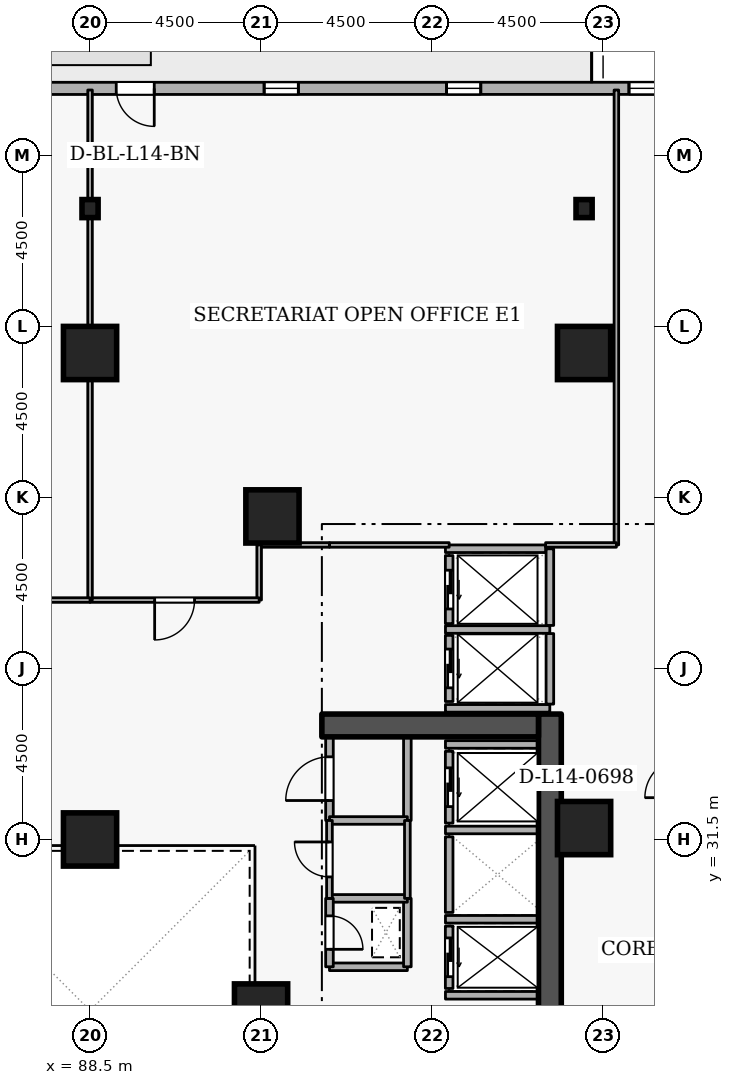
"""IFC4 building model, lengths in metres.
Left out: names, types, materials, properties, quantities, classifications, styles, units other than length and angle.
Written with IfcOpenShell. Run it as: python <this file> out.ifc"""

import sys

from ifc_helpers import new_model, si_unit, direction, frame, frame_2d, origin, origin_2d, place, context, subcontext, project, spatial, rectangle, i_section, extrude, element, fill, save


model = new_model("IFC4")
c1 = context("Model", 3, precision=1e-05, world=origin(), true_north=direction((0.0, 1.0)))
c2 = subcontext(c1, "Body", "Model", "MODEL_VIEW")
j1 = project(units=[si_unit("LENGTHUNIT", "METRE"), si_unit("PLANEANGLEUNIT", "RADIAN")], contexts=[c1])
p1 = place(None, origin())
s1 = spatial("IfcSite", under=j1, at=p1, CompositionType="ELEMENT")
p2 = place(p1, origin())
s2 = spatial("IfcBuilding", under=s1, at=p2, CompositionType="ELEMENT")
p3 = place(p2, frame((0.0, 0.0, 57.3)))
s3 = spatial("IfcBuildingStorey", under=s2, at=p3, CompositionType="ELEMENT", Elevation=57.3)
p4 = place(p3, frame((100.6, 19.2, 0.0), z_axis=(0.0, 0.0, 1.0), x_axis=(0.0, 1.0, 0.0)))
e1 = element("IfcWall", 1, at=p4, inside=s3, PredefinedType="SHEAR", context=c2, shape_type="SweptSolid", body=[
    extrude(rectangle(XDim=15.6, YDim=0.6, at=frame_2d((7.8, 0.0))), origin(), (0.0, 0.0, 1.0), 3.6),
])
p5 = place(p3, frame((94.6, 34.5, 0.0), z_axis=(0.0, 0.0, 1.0), x_axis=(1.0, 0.0, 0.0)))
e2 = element("IfcWall", 2, at=p5, inside=s3, PredefinedType="SHEAR", context=c2, shape_type="SweptSolid", body=[
    extrude(rectangle(XDim=5.7, YDim=0.6, at=frame_2d((2.85, 0.0))), origin(), (0.0, 0.0, 1.0), 3.6),
])
for number, where, z_axis, x_axis in (
    (3, (101.5, 44.3, 0.0), (0.0, 0.0, 1.0), (1.0, 0.0, 0.0)),
    (4, (88.5, 44.3, 0.0), (0.0, 0.0, 1.0), (1.0, 0.0, 0.0)),
    (5, (93.3, 40.0, 0.0), (0.0, 0.0, 1.0), (1.0, 0.0, 0.0)),
    (6, (101.5, 31.8, 0.0), (0.0, 0.0, 1.0), (1.0, 0.0, 0.0)),
    (7, (93.0, 27.0, 0.0), (0.0, 0.0, 1.0), (1.0, 0.0, 0.0)),
    (8, (88.5, 31.5, 0.0), (0.0, 0.0, 1.0), (1.0, 0.0, 0.0)),
):
    element("IfcColumn", number, at=place(p3, frame(where, z_axis=z_axis, x_axis=x_axis)), inside=s3, PredefinedType="COLUMN", context=c2, shape_type="SweptSolid", body=[
        extrude(rectangle(XDim=1.4, YDim=1.4, at=origin_2d()), origin(), (0.0, 0.0, 1.0), 3.6),
    ])
for number, where, z_axis, x_axis in (
    (9, (101.5, 48.1, 0.0), (0.0, 0.0, 1.0), (1.0, 0.0, 0.0)),
    (10, (88.5, 48.1, 0.0), (0.0, 0.0, 1.0), (1.0, 0.0, 0.0)),
):
    element("IfcColumn", number, at=place(p3, frame(where, z_axis=z_axis, x_axis=x_axis)), inside=s3, PredefinedType="COLUMN", context=c2, shape_type="SweptSolid", body=[
        extrude(i_section(OverallWidth=0.424, OverallDepth=0.475, WebThickness=0.048, FlangeThickness=0.077, FilletRadius=0.015, at=origin_2d()), origin(), (0.0, 0.0, 1.0), 3.6),
    ])
p6 = place(p3, frame((110.181, 51.265, 0.0), z_axis=(0.0, 0.0, 1.0), x_axis=(-0.999999996195, -8.7231344e-05, 0.0)))
e11 = element("IfcWall", 11, at=p6, inside=s3, PredefinedType="STANDARD", context=c2, shape_type="SweptSolid", body=[
    extrude(rectangle(XDim=36.384, YDim=0.32, at=frame_2d((18.192, 0.0))), origin(), (0.0, 0.0, 1.0), 2.7),
])
p7 = place(p6, frame((19.992, 0.0, 0.0)))
e12 = element("IfcOpeningElement", 12, at=p7, cuts=e11, PredefinedType="OPENING", context=c2, shape_type="SweptSolid", body=[
    extrude(rectangle(XDim=1.0, YDim=2.08, at=frame_2d((0.5, 1.04))), frame((0.0, 0.17, 0.0), z_axis=(0.0, -1.0, 0.0), x_axis=(1.0, 0.0, 0.0)), (0.0, 0.0, 1.0), 0.34),
])
p8 = place(p6, frame((1.8, 0.0, 0.72)))
e13 = element("IfcOpeningElement", 13, at=p8, cuts=e11, PredefinedType="OPENING", context=c2, shape_type="SweptSolid", body=[
    extrude(rectangle(XDim=0.9, YDim=1.75, at=frame_2d((0.45, 0.875))), frame((0.0, 0.17, 0.0), z_axis=(0.0, -1.0, 0.0), x_axis=(1.0, 0.0, 0.0)), (0.0, 0.0, 1.0), 0.34),
])
p9 = place(p6, frame((6.6, 0.0, 0.72)))
e14 = element("IfcOpeningElement", 14, at=p9, cuts=e11, PredefinedType="OPENING", context=c2, shape_type="SweptSolid", body=[
    extrude(rectangle(XDim=0.9, YDim=1.75, at=frame_2d((0.45, 0.875))), frame((0.0, 0.17, 0.0), z_axis=(0.0, -1.0, 0.0), x_axis=(1.0, 0.0, 0.0)), (0.0, 0.0, 1.0), 0.34),
])
p10 = place(p6, frame((11.4, 0.0, 0.72)))
e15 = element("IfcOpeningElement", 15, at=p10, cuts=e11, PredefinedType="OPENING", context=c2, shape_type="SweptSolid", body=[
    extrude(rectangle(XDim=0.9, YDim=1.75, at=frame_2d((0.45, 0.875))), frame((0.0, 0.17, 0.0), z_axis=(0.0, -1.0, 0.0), x_axis=(1.0, 0.0, 0.0)), (0.0, 0.0, 1.0), 0.34),
])
p11 = place(p6, frame((16.2, 0.0, 0.72)))
e16 = element("IfcOpeningElement", 16, at=p11, cuts=e11, PredefinedType="OPENING", context=c2, shape_type="SweptSolid", body=[
    extrude(rectangle(XDim=0.9, YDim=1.75, at=frame_2d((0.45, 0.875))), frame((0.0, 0.17, 0.0), z_axis=(0.0, -1.0, 0.0), x_axis=(1.0, 0.0, 0.0)), (0.0, 0.0, 1.0), 0.34),
])
p12 = place(p6, frame((25.8, 0.0, 0.72)))
e17 = element("IfcOpeningElement", 17, at=p12, cuts=e11, PredefinedType="OPENING", context=c2, shape_type="SweptSolid", body=[
    extrude(rectangle(XDim=0.9, YDim=1.75, at=frame_2d((0.45, 0.875))), frame((0.0, 0.17, 0.0), z_axis=(0.0, -1.0, 0.0), x_axis=(1.0, 0.0, 0.0)), (0.0, 0.0, 1.0), 0.34),
])
p13 = place(p6, frame((30.6, 0.0, 0.72)))
e18 = element("IfcOpeningElement", 18, at=p13, cuts=e11, PredefinedType="OPENING", context=c2, shape_type="SweptSolid", body=[
    extrude(rectangle(XDim=0.9, YDim=1.75, at=frame_2d((0.45, 0.875))), frame((0.0, 0.17, 0.0), z_axis=(0.0, -1.0, 0.0), x_axis=(1.0, 0.0, 0.0)), (0.0, 0.0, 1.0), 0.34),
])
p14 = place(p3, frame((97.95, 29.22, 0.0), z_axis=(0.0, 0.0, 1.0), x_axis=(0.0, -1.0, 0.0)))
e19 = element("IfcWall", 19, at=p14, inside=s3, PredefinedType="STANDARD", context=c2, shape_type="SweptSolid", body=[
    extrude(rectangle(XDim=1.64, YDim=0.2, at=frame_2d((0.82, 0.0))), origin(), (0.0, 0.0, 1.0), 3.34),
])
p15 = place(p14, frame((0.31, 0.0, 0.0)))
e20 = element("IfcOpeningElement", 20, at=p15, cuts=e19, PredefinedType="OPENING", context=c2, shape_type="SweptSolid", body=[
    extrude(rectangle(XDim=1.02, YDim=2.06, at=frame_2d((0.51, 1.03))), frame((0.0, 0.11, 0.0), z_axis=(0.0, -1.0, 0.0), x_axis=(1.0, 0.0, 0.0)), (0.0, 0.0, 1.0), 0.22),
])
p16 = place(p3, frame((97.95, 31.57, 0.0), z_axis=(0.0, 0.0, 1.0), x_axis=(0.0, -1.0, 0.0)))
e21 = element("IfcWall", 21, at=p16, inside=s3, PredefinedType="STANDARD", context=c2, shape_type="SweptSolid", body=[
    extrude(rectangle(XDim=1.99, YDim=0.2, at=frame_2d((0.995, 0.0))), origin(), (0.0, 0.0, 1.0), 3.34),
])
p17 = place(p3, frame((97.95, 33.82, 0.0), z_axis=(0.0, 0.0, 1.0), x_axis=(0.0, -1.0, 0.0)))
e22 = element("IfcWall", 22, at=p17, inside=s3, PredefinedType="STANDARD", context=c2, shape_type="SweptSolid", body=[
    extrude(rectangle(XDim=1.89, YDim=0.2, at=frame_2d((0.945, 0.0))), origin(), (0.0, 0.0, 1.0), 3.34),
])
p18 = place(p17, frame((0.435, 0.0, 0.0)))
e23 = element("IfcOpeningElement", 23, at=p18, cuts=e22, PredefinedType="OPENING", context=c2, shape_type="SweptSolid", body=[
    extrude(rectangle(XDim=1.02, YDim=2.06, at=frame_2d((0.51, 1.03))), frame((0.0, 0.11, 0.0), z_axis=(0.0, -1.0, 0.0), x_axis=(1.0, 0.0, 0.0)), (0.0, 0.0, 1.0), 0.22),
])
p19 = place(p3, frame((97.95, 36.87, 0.0), z_axis=(0.0, 0.0, 1.0), x_axis=(0.0, -1.0, 0.0)))
e24 = element("IfcWall", 24, at=p19, inside=s3, PredefinedType="STANDARD", context=c2, shape_type="SweptSolid", body=[
    extrude(rectangle(XDim=1.74, YDim=0.2, at=frame_2d((0.87, 0.0))), origin(), (0.0, 0.0, 1.0), 3.34),
])
p20 = place(p19, frame((0.36, 0.0, 0.0)))
e25 = element("IfcOpeningElement", 25, at=p20, cuts=e24, PredefinedType="OPENING", context=c2, shape_type="SweptSolid", body=[
    extrude(rectangle(XDim=1.02, YDim=2.06, at=frame_2d((0.51, 1.03))), frame((0.0, 0.11, 0.0), z_axis=(0.0, -1.0, 0.0), x_axis=(1.0, 0.0, 0.0)), (0.0, 0.0, 1.0), 0.22),
])
p21 = place(p3, frame((97.95, 38.97, 0.0), z_axis=(0.0, 0.0, 1.0), x_axis=(0.0, -1.0, 0.0)))
e26 = element("IfcWall", 26, at=p21, inside=s3, PredefinedType="STANDARD", context=c2, shape_type="SweptSolid", body=[
    extrude(rectangle(XDim=1.79, YDim=0.2, at=frame_2d((0.895, 0.0))), origin(), (0.0, 0.0, 1.0), 3.34),
])
p22 = place(p21, frame((0.385, 0.0, 0.0)))
e27 = element("IfcOpeningElement", 27, at=p22, cuts=e26, PredefinedType="OPENING", context=c2, shape_type="SweptSolid", body=[
    extrude(rectangle(XDim=1.02, YDim=2.06, at=frame_2d((0.51, 1.03))), frame((0.0, 0.11, 0.0), z_axis=(0.0, -1.0, 0.0), x_axis=(1.0, 0.0, 0.0)), (0.0, 0.0, 1.0), 0.22),
])
for number, where, z_axis, x_axis in (
    (28, (97.852, 29.4, 0.0), (0.0, 0.0, 1.0), (1.0, 0.0, 0.0)),
    (29, (97.852, 27.4, 0.0), (0.0, 0.0, 1.0), (1.0, 0.0, 0.0)),
    (30, (97.852, 31.75, 0.0), (0.0, 0.0, 1.0), (1.0, 0.0, 0.0)),
    (31, (97.852, 34.0, 0.0), (0.0, 0.0, 1.0), (1.0, 0.0, 0.0)),
):
    element("IfcWall", number, at=place(p3, frame(where, z_axis=z_axis, x_axis=x_axis)), inside=s3, PredefinedType="STANDARD", context=c2, shape_type="SweptSolid", body=[
        extrude(rectangle(XDim=2.436, YDim=0.2, at=frame_2d((1.218, 0.0))), origin(), (0.0, 0.0, 1.0), 3.34),
    ])
for number, where, z_axis, x_axis in (
    (32, (97.852, 37.025, 0.0), (0.0, 0.0, 1.0), (1.0, 0.0, 0.0)),
    (33, (97.852, 34.95, 0.0), (0.0, 0.0, 1.0), (1.0, 0.0, 0.0)),
):
    element("IfcWall", number, at=place(p3, frame(where, z_axis=z_axis, x_axis=x_axis)), inside=s3, PredefinedType="STANDARD", context=c2, shape_type="SweptSolid", body=[
        extrude(rectangle(XDim=2.746, YDim=0.2, at=frame_2d((1.373, 0.0))), origin(), (0.0, 0.0, 1.0), 3.34),
    ])
p23 = place(p3, frame((100.6, 35.062, 0.0), z_axis=(0.0, 0.0, 1.0), x_axis=(0.0, 1.0, 0.0)))
e34 = element("IfcWall", 34, at=p23, inside=s3, PredefinedType="STANDARD", context=c2, shape_type="SweptSolid", body=[
    extrude(rectangle(XDim=1.856, YDim=0.2, at=frame_2d((0.928, 0.0))), origin(), (0.0, 0.0, 1.0), 3.34),
])
p24 = place(p3, frame((100.6, 37.132, 0.0), z_axis=(0.0, 0.0, 1.0), x_axis=(0.0, 1.0, 0.0)))
e35 = element("IfcWall", 35, at=p24, inside=s3, PredefinedType="STANDARD", context=c2, shape_type="SweptSolid", body=[
    extrude(rectangle(XDim=2.016, YDim=0.2, at=frame_2d((1.008, 0.0))), origin(), (0.0, 0.0, 1.0), 3.34),
])
p25 = place(p3, frame((97.852, 39.15, 0.0), z_axis=(0.0, 0.0, 1.0), x_axis=(1.0, 0.0, 0.0)))
e36 = element("IfcWall", 36, at=p25, inside=s3, PredefinedType="STANDARD", context=c2, shape_type="SweptSolid", body=[
    extrude(rectangle(XDim=2.636, YDim=0.2, at=frame_2d((1.318, 0.0))), origin(), (0.0, 0.0, 1.0), 3.34),
])
p26 = place(p3, frame((94.8, 28.15, 0.0), z_axis=(0.0, 0.0, 1.0), x_axis=(1.0, 0.0, 0.0)))
e37 = element("IfcWall", 37, at=p26, inside=s3, PredefinedType="STANDARD", context=c2, shape_type="SweptSolid", body=[
    extrude(rectangle(XDim=2.05, YDim=0.2, at=frame_2d((1.025, 0.0))), origin(), (0.0, 0.0, 1.0), 3.34),
])
p27 = place(p3, frame((96.85, 28.15, 0.0), z_axis=(0.0, 0.0, 1.0), x_axis=(0.0, 1.0, 0.0)))
e38 = element("IfcWall", 38, at=p27, inside=s3, PredefinedType="STANDARD", context=c2, shape_type="SweptSolid", body=[
    extrude(rectangle(XDim=1.8, YDim=0.2, at=frame_2d((0.9, 0.0))), origin(), (0.0, 0.0, 1.0), 3.34),
])
p28 = place(p3, frame((96.85, 29.95, 0.0), z_axis=(0.0, 0.0, 1.0), x_axis=(-1.0, 0.0, 0.0)))
e39 = element("IfcWall", 39, at=p28, inside=s3, PredefinedType="STANDARD", context=c2, shape_type="SweptSolid", body=[
    extrude(rectangle(XDim=2.05, YDim=0.2, at=frame_2d((1.025, 0.0))), origin(), (0.0, 0.0, 1.0), 3.34),
])
p29 = place(p3, frame((94.8, 29.95, 0.0), z_axis=(0.0, 0.0, 1.0), x_axis=(0.0, -1.0, 0.0)))
e40 = element("IfcWall", 40, at=p29, inside=s3, PredefinedType="STANDARD", context=c2, shape_type="SweptSolid", body=[
    extrude(rectangle(XDim=1.8, YDim=0.2, at=frame_2d((0.9, 0.0))), origin(), (0.0, 0.0, 1.0), 3.34),
])
p30 = place(p29, frame((0.46, 0.0, 0.0)))
e41 = element("IfcOpeningElement", 41, at=p30, cuts=e40, PredefinedType="OPENING", context=c2, shape_type="SweptSolid", body=[
    extrude(rectangle(XDim=0.88, YDim=2.04, at=frame_2d((0.44, 1.02))), frame((0.0, 0.11, 0.0), z_axis=(0.0, -1.0, 0.0), x_axis=(1.0, 0.0, 0.0)), (0.0, 0.0, 1.0), 0.22),
])
p31 = place(p3, frame((94.8, 32.0, 0.0), z_axis=(0.0, 0.0, 1.0), x_axis=(0.0, 1.0, 0.0)))
e42 = element("IfcWall", 42, at=p31, inside=s3, PredefinedType="STANDARD", context=c2, shape_type="SweptSolid", body=[
    extrude(rectangle(XDim=2.2, YDim=0.2, at=frame_2d((1.1, 0.0))), origin(), (0.0, 0.0, 1.0), 3.34),
])
p32 = place(p31, frame((0.525, 0.0, 0.0)))
e43 = element("IfcOpeningElement", 43, at=p32, cuts=e42, PredefinedType="OPENING", context=c2, shape_type="SweptSolid", body=[
    extrude(rectangle(XDim=1.15, YDim=2.1, at=frame_2d((0.575, 1.05))), frame((0.0, 0.11, 0.0), z_axis=(0.0, -1.0, 0.0), x_axis=(1.0, 0.0, 0.0)), (0.0, 0.0, 1.0), 0.22),
])
p33 = place(p3, frame((96.85, 34.2, 0.0), z_axis=(0.0, 0.0, 1.0), x_axis=(0.0, -1.0, 0.0)))
e44 = element("IfcWall", 44, at=p33, inside=s3, PredefinedType="STANDARD", context=c2, shape_type="SweptSolid", body=[
    extrude(rectangle(XDim=2.2, YDim=0.2, at=frame_2d((1.1, 0.0))), origin(), (0.0, 0.0, 1.0), 3.34),
])
p34 = place(p3, frame((96.85, 32.0, 0.0), z_axis=(0.0, 0.0, 1.0), x_axis=(-1.0, 0.0, 0.0)))
e45 = element("IfcWall", 45, at=p34, inside=s3, PredefinedType="STANDARD", context=c2, shape_type="SweptSolid", body=[
    extrude(rectangle(XDim=2.05, YDim=0.2, at=frame_2d((1.025, 0.0))), origin(), (0.0, 0.0, 1.0), 3.34),
])
p35 = place(p3, frame((94.8, 29.95, 0.0), z_axis=(0.0, 0.0, 1.0), x_axis=(0.0, 1.0, 0.0)))
e46 = element("IfcWall", 46, at=p35, inside=s3, PredefinedType="PARTITIONING", context=c2, shape_type="SweptSolid", body=[
    extrude(rectangle(XDim=2.05, YDim=0.15, at=frame_2d((1.025, 0.0))), origin(), (0.0, 0.0, 1.0), 3.34),
])
p36 = place(p35, frame((0.565, 0.0, 0.0)))
e47 = element("IfcOpeningElement", 47, at=p36, cuts=e46, PredefinedType="OPENING", context=c2, shape_type="SweptSolid", body=[
    extrude(rectangle(XDim=0.92, YDim=2.08, at=frame_2d((0.46, 1.04))), frame((0.0, 0.085, 0.0), z_axis=(0.0, -1.0, 0.0), x_axis=(1.0, 0.0, 0.0)), (0.0, 0.0, 1.0), 0.17),
])
p37 = place(p3, frame((96.85, 32.0, 0.0), z_axis=(0.0, 0.0, 1.0), x_axis=(0.0, -1.0, 0.0)))
e48 = element("IfcWall", 48, at=p37, inside=s3, PredefinedType="PARTITIONING", context=c2, shape_type="SweptSolid", body=[
    extrude(rectangle(XDim=2.05, YDim=0.15, at=frame_2d((1.025, 0.0))), origin(), (0.0, 0.0, 1.0), 3.34),
])
p38 = place(p3, frame((97.95, 39.25, 0.0), z_axis=(0.0, 0.0, 1.0), x_axis=(-1.0, 0.0, 0.0)))
e49 = element("IfcWall", 49, at=p38, inside=s3, PredefinedType="PARTITIONING", context=c2, shape_type="SweptSolid", body=[
    extrude(rectangle(XDim=3.15, YDim=0.12, at=frame_2d((1.575, 0.0))), origin(), (0.0, 0.0, 1.0), 3.34),
])
p39 = place(p3, frame((94.8, 39.25, 0.0), z_axis=(0.0, 0.0, 1.0), x_axis=(-1.0, 0.0, 0.0)))
e50 = element("IfcWall", 50, at=p39, inside=s3, PredefinedType="PARTITIONING", context=c2, shape_type="SweptSolid", body=[
    extrude(rectangle(XDim=1.85, YDim=0.12, at=frame_2d((0.925, 0.0))), origin(), (0.0, 0.0, 1.0), 3.34),
])
p40 = place(p3, frame((92.95, 39.25, 0.0), z_axis=(0.0, 0.0, 1.0), x_axis=(0.0, -1.0, 0.0)))
e51 = element("IfcWall", 51, at=p40, inside=s3, PredefinedType="PARTITIONING", context=c2, shape_type="SweptSolid", body=[
    extrude(rectangle(XDim=1.45, YDim=0.12, at=frame_2d((0.725, 0.0))), origin(), (0.0, 0.0, 1.0), 3.34),
])
p41 = place(p3, frame((92.95, 37.8, 0.0), z_axis=(0.0, 0.0, 1.0), x_axis=(-1.0, 0.0, 0.0)))
e52 = element("IfcWall", 52, at=p41, inside=s3, PredefinedType="PARTITIONING", context=c2, shape_type="SweptSolid", body=[
    extrude(rectangle(XDim=4.45, YDim=0.12, at=frame_2d((2.225, 0.0))), origin(), (0.0, 0.0, 1.0), 3.34),
])
p42 = place(p41, frame((1.7, 0.0, 0.0)))
e53 = element("IfcOpeningElement", 53, at=p42, cuts=e52, PredefinedType="OPENING", context=c2, shape_type="SweptSolid", body=[
    extrude(rectangle(XDim=1.05, YDim=2.1, at=frame_2d((0.525, 1.05))), frame((0.0, 0.07, 0.0), z_axis=(0.0, -1.0, 0.0), x_axis=(1.0, 0.0, 0.0)), (0.0, 0.0, 1.0), 0.14),
])
p43 = place(p3, frame((88.5, 37.8, 0.0), z_axis=(0.0, 0.0, 1.0), x_axis=(0.0, 1.0, 0.0)))
e54 = element("IfcWall", 54, at=p43, inside=s3, PredefinedType="PARTITIONING", context=c2, shape_type="SweptSolid", body=[
    extrude(rectangle(XDim=13.42, YDim=0.12, at=frame_2d((6.71, 0.0))), origin(), (0.0, 0.0, 1.0), 2.932),
])
p44 = place(p3, frame((102.35, 51.22, 0.0), z_axis=(0.0, 0.0, 1.0), x_axis=(0.0, -1.0, 0.0)))
e55 = element("IfcWall", 55, at=p44, inside=s3, PredefinedType="PARTITIONING", context=c2, shape_type="SweptSolid", body=[
    extrude(rectangle(XDim=11.97, YDim=0.12, at=frame_2d((5.985, 0.0))), origin(), (0.0, 0.0, 1.0), 3.34),
])
p45 = place(p3, frame((102.35, 39.25, 0.0), z_axis=(0.0, 0.0, 1.0), x_axis=(-1.0, 0.0, 0.0)))
e56 = element("IfcWall", 56, at=p45, inside=s3, PredefinedType="PARTITIONING", context=c2, shape_type="SweptSolid", body=[
    extrude(rectangle(XDim=1.862, YDim=0.12, at=frame_2d((0.931, 0.0))), origin(), (0.0, 0.0, 1.0), 3.34),
])
p46 = place(p3, frame((88.5, 37.8, 0.0), z_axis=(0.0, 0.0, 1.0), x_axis=(-1.0, 0.0, 0.0)))
e57 = element("IfcWall", 57, at=p46, inside=s3, PredefinedType="PARTITIONING", context=c2, shape_type="SweptSolid", body=[
    extrude(rectangle(XDim=4.45, YDim=0.12, at=frame_2d((2.225, 0.0))), origin(), (0.0, 0.0, 1.0), 3.34),
])
p47 = place(p46, frame((1.7, 0.0, 0.0)))
e58 = element("IfcOpeningElement", 58, at=p47, cuts=e57, PredefinedType="OPENING", context=c2, shape_type="SweptSolid", body=[
    extrude(rectangle(XDim=1.05, YDim=2.1, at=frame_2d((0.525, 1.05))), frame((0.0, 0.07, 0.0), z_axis=(0.0, -1.0, 0.0), x_axis=(1.0, 0.0, 0.0)), (0.0, 0.0, 1.0), 0.14),
])
p48 = place(p7, origin())
e59 = element("IfcDoor", 59, at=p48, inside=s3, OperationType="SINGLE_SWING_LEFT", PredefinedType="DOOR", context=c2, shape_type="SweptSolid", body=[
    extrude(rectangle(XDim=1.0, YDim=2.08, at=frame_2d((0.5, 1.04))), frame((0.0, 0.025, 0.0), z_axis=(0.0, -1.0, 0.0), x_axis=(1.0, 0.0, 0.0)), (0.0, 0.0, 1.0), 0.05),
])
fill(e12, e59)
p49 = place(p9, origin())
e60 = element("IfcWindow", 60, at=p49, inside=s3, PartitioningType="SINGLE_PANEL", PredefinedType="WINDOW", context=c2, shape_type="SweptSolid", body=[
    extrude(rectangle(XDim=0.9, YDim=1.75, at=frame_2d((0.45, 0.875))), frame((0.0, 0.03, 0.0), z_axis=(0.0, -1.0, 0.0), x_axis=(1.0, 0.0, 0.0)), (0.0, 0.0, 1.0), 0.06),
])
fill(e14, e60)
p50 = place(p10, origin())
e61 = element("IfcWindow", 61, at=p50, inside=s3, PartitioningType="SINGLE_PANEL", PredefinedType="WINDOW", context=c2, shape_type="SweptSolid", body=[
    extrude(rectangle(XDim=0.9, YDim=1.75, at=frame_2d((0.45, 0.875))), frame((0.0, 0.03, 0.0), z_axis=(0.0, -1.0, 0.0), x_axis=(1.0, 0.0, 0.0)), (0.0, 0.0, 1.0), 0.06),
])
fill(e15, e61)
p51 = place(p11, origin())
e62 = element("IfcWindow", 62, at=p51, inside=s3, PartitioningType="SINGLE_PANEL", PredefinedType="WINDOW", context=c2, shape_type="SweptSolid", body=[
    extrude(rectangle(XDim=0.9, YDim=1.75, at=frame_2d((0.45, 0.875))), frame((0.0, 0.03, 0.0), z_axis=(0.0, -1.0, 0.0), x_axis=(1.0, 0.0, 0.0)), (0.0, 0.0, 1.0), 0.06),
])
fill(e16, e62)
p52 = place(p15, origin())
e63 = element("IfcDoor", 63, at=p52, inside=s3, OperationType="SLIDING_TO_LEFT", PredefinedType="DOOR", context=c2, shape_type="SweptSolid", body=[
    extrude(rectangle(XDim=1.02, YDim=2.06, at=frame_2d((0.51, 1.03))), frame((0.0, 0.025, 0.0), z_axis=(0.0, -1.0, 0.0), x_axis=(1.0, 0.0, 0.0)), (0.0, 0.0, 1.0), 0.05),
])
fill(e20, e63)
p53 = place(p18, origin())
e64 = element("IfcDoor", 64, at=p53, inside=s3, OperationType="SLIDING_TO_LEFT", PredefinedType="DOOR", context=c2, shape_type="SweptSolid", body=[
    extrude(rectangle(XDim=1.02, YDim=2.06, at=frame_2d((0.51, 1.03))), frame((0.0, 0.025, 0.0), z_axis=(0.0, -1.0, 0.0), x_axis=(1.0, 0.0, 0.0)), (0.0, 0.0, 1.0), 0.05),
])
fill(e23, e64)
p54 = place(p20, origin())
e65 = element("IfcDoor", 65, at=p54, inside=s3, OperationType="SLIDING_TO_LEFT", PredefinedType="DOOR", context=c2, shape_type="SweptSolid", body=[
    extrude(rectangle(XDim=1.02, YDim=2.06, at=frame_2d((0.51, 1.03))), frame((0.0, 0.025, 0.0), z_axis=(0.0, -1.0, 0.0), x_axis=(1.0, 0.0, 0.0)), (0.0, 0.0, 1.0), 0.05),
])
fill(e25, e65)
p55 = place(p22, origin())
e66 = element("IfcDoor", 66, at=p55, inside=s3, OperationType="SLIDING_TO_LEFT", PredefinedType="DOOR", context=c2, shape_type="SweptSolid", body=[
    extrude(rectangle(XDim=1.02, YDim=2.06, at=frame_2d((0.51, 1.03))), frame((0.0, 0.025, 0.0), z_axis=(0.0, -1.0, 0.0), x_axis=(1.0, 0.0, 0.0)), (0.0, 0.0, 1.0), 0.05),
])
fill(e27, e66)
p56 = place(p30, origin())
e67 = element("IfcDoor", 67, at=p56, inside=s3, OperationType="SINGLE_SWING_RIGHT", PredefinedType="DOOR", context=c2, shape_type="SweptSolid", body=[
    extrude(rectangle(XDim=0.88, YDim=2.04, at=frame_2d((0.44, 1.02))), frame((0.0, 0.025, 0.0), z_axis=(0.0, -1.0, 0.0), x_axis=(1.0, 0.0, 0.0)), (0.0, 0.0, 1.0), 0.05),
])
fill(e41, e67)
p57 = place(p36, origin())
e68 = element("IfcDoor", 68, at=p57, inside=s3, OperationType="SINGLE_SWING_RIGHT", PredefinedType="DOOR", context=c2, shape_type="SweptSolid", body=[
    extrude(rectangle(XDim=0.92, YDim=2.08, at=frame_2d((0.46, 1.04))), frame((0.0, 0.025, 0.0), z_axis=(0.0, -1.0, 0.0), x_axis=(1.0, 0.0, 0.0)), (0.0, 0.0, 1.0), 0.05),
])
fill(e47, e68)
p58 = place(p32, origin())
e69 = element("IfcDoor", 69, at=p58, inside=s3, OperationType="SINGLE_SWING_LEFT", PredefinedType="DOOR", context=c2, shape_type="SweptSolid", body=[
    extrude(rectangle(XDim=1.15, YDim=2.1, at=frame_2d((0.575, 1.05))), frame((0.0, 0.025, 0.0), z_axis=(0.0, -1.0, 0.0), x_axis=(1.0, 0.0, 0.0)), (0.0, 0.0, 1.0), 0.05),
])
fill(e43, e69)
p59 = place(p42, origin())
e70 = element("IfcDoor", 70, at=p59, inside=s3, OperationType="SINGLE_SWING_RIGHT", PredefinedType="DOOR", context=c2, shape_type="SweptSolid", body=[
    extrude(rectangle(XDim=1.05, YDim=2.1, at=frame_2d((0.525, 1.05))), frame((0.0, 0.025, 0.0), z_axis=(0.0, -1.0, 0.0), x_axis=(1.0, 0.0, 0.0)), (0.0, 0.0, 1.0), 0.05),
])
fill(e53, e70)
save(model, sys.argv[1])
